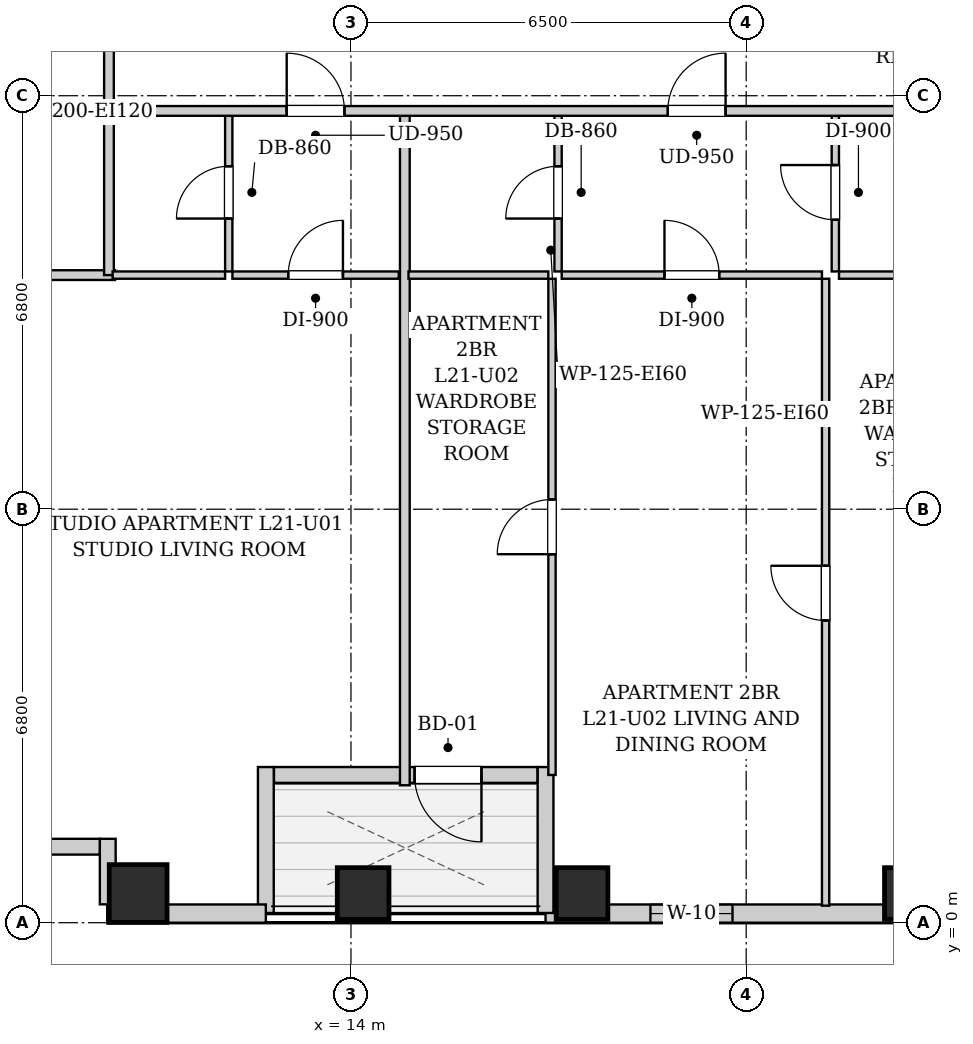
"""IFC4 building model, lengths in metres.
Left out: names, types, materials, properties, quantities, classifications, styles, units other than length and angle.
Written with IfcOpenShell. Run it as: python <this file> out.ifc"""

import sys

from ifc_helpers import new_model, si_unit, direction, frame, frame_2d, origin, origin_2d, place, context, subcontext, project, spatial, rectangle, extrude, element, fill, save


model = new_model("IFC4")
c1 = context("Model", 3, precision=1e-05, world=origin(), true_north=direction((0.0, 1.0)))
c2 = subcontext(c1, "Body", "Model", "MODEL_VIEW")
j1 = project(units=[si_unit("LENGTHUNIT", "METRE"), si_unit("PLANEANGLEUNIT", "RADIAN")], contexts=[c1])
p1 = place(None, origin())
s1 = spatial("IfcSite", under=j1, at=p1, CompositionType="ELEMENT")
p2 = place(p1, origin())
s2 = spatial("IfcBuilding", under=s1, at=p2, CompositionType="ELEMENT")
p3 = place(p2, frame((0.0, 0.0, 78.3)))
s3 = spatial("IfcBuildingStorey", under=s2, at=p3, CompositionType="ELEMENT", Elevation=78.3)
p4 = place(p3, frame((10.5, 0.48, 0.0), z_axis=(0.0, 0.0, 1.0), x_axis=(1.0, 0.0, 0.0)))
e1 = element("IfcColumn", 1, at=p4, inside=s3, PredefinedType="COLUMN", context=c2, shape_type="SweptSolid", body=[
    extrude(rectangle(XDim=0.95, YDim=0.95, at=origin_2d()), origin(), (0.0, 0.0, 1.0), 3.2),
])
for number, where, z_axis, x_axis in (
    (2, (14.2, 0.48, 0.0), (0.0, 0.0, 1.0), (1.0, 0.0, 0.0)),
    (3, (17.8, 0.48, 0.0), (0.0, 0.0, 1.0), (1.0, 0.0, 0.0)),
    (4, (23.2, 0.48, 0.0), (0.0, 0.0, 1.0), (1.0, 0.0, 0.0)),
):
    element("IfcColumn", number, at=place(p3, frame(where, z_axis=z_axis, x_axis=x_axis)), inside=s3, PredefinedType="COLUMN", context=c2, shape_type="SweptSolid", body=[
        extrude(rectangle(XDim=0.85, YDim=0.85, at=origin_2d()), origin(), (0.0, 0.0, 1.0), 3.2),
    ])
p5 = place(p3, frame((40.9, 0.15, 0.0), z_axis=(0.0, 0.0, 1.0), x_axis=(-1.0, 0.0, 0.0)))
e5 = element("IfcWall", 5, at=p5, inside=s3, PredefinedType="SOLIDWALL", context=c2, shape_type="SweptSolid", body=[
    extrude(rectangle(XDim=23.7, YDim=0.3, at=frame_2d((11.85, 0.0))), origin(), (0.0, 0.0, 1.0), 2.94),
])
p6 = place(p5, frame((20.625, 0.0, 0.55)))
e6 = element("IfcOpeningElement", 6, at=p6, cuts=e5, PredefinedType="OPENING", context=c2, shape_type="SweptSolid", body=[
    extrude(rectangle(XDim=1.35, YDim=1.2, at=frame_2d((0.675, 0.6))), frame((0.0, 0.16, 0.0), z_axis=(0.0, -1.0, 0.0), x_axis=(1.0, 0.0, 0.0)), (0.0, 0.0, 1.0), 0.32),
])
p7 = place(p5, frame((12.55, 0.0, 0.55)))
e7 = element("IfcOpeningElement", 7, at=p7, cuts=e5, PredefinedType="OPENING", context=c2, shape_type="SweptSolid", body=[
    extrude(rectangle(XDim=0.85, YDim=1.2, at=frame_2d((0.425, 0.6))), frame((0.0, 0.16, 0.0), z_axis=(0.0, -1.0, 0.0), x_axis=(1.0, 0.0, 0.0)), (0.0, 0.0, 1.0), 0.32),
])
p8 = place(p5, frame((9.6, 0.0, 0.55)))
e8 = element("IfcOpeningElement", 8, at=p8, cuts=e5, PredefinedType="OPENING", context=c2, shape_type="SweptSolid", body=[
    extrude(rectangle(XDim=1.35, YDim=1.2, at=frame_2d((0.675, 0.6))), frame((0.0, 0.16, 0.0), z_axis=(0.0, -1.0, 0.0), x_axis=(1.0, 0.0, 0.0)), (0.0, 0.0, 1.0), 0.32),
])
p9 = place(p5, frame((5.765, 0.0, 0.55)))
e9 = element("IfcOpeningElement", 9, at=p9, cuts=e5, PredefinedType="OPENING", context=c2, shape_type="SweptSolid", body=[
    extrude(rectangle(XDim=1.35, YDim=1.2, at=frame_2d((0.675, 0.6))), frame((0.0, 0.16, 0.0), z_axis=(0.0, -1.0, 0.0), x_axis=(1.0, 0.0, 0.0)), (0.0, 0.0, 1.0), 0.32),
])
p10 = place(p5, frame((2.1, 0.0, 0.55)))
e10 = element("IfcOpeningElement", 10, at=p10, cuts=e5, PredefinedType="OPENING", context=c2, shape_type="SweptSolid", body=[
    extrude(rectangle(XDim=1.35, YDim=1.2, at=frame_2d((0.675, 0.6))), frame((0.0, 0.16, 0.0), z_axis=(0.0, -1.0, 0.0), x_axis=(1.0, 0.0, 0.0)), (0.0, 0.0, 1.0), 0.32),
])
p11 = place(p3, frame((17.2, 0.16, 0.0), z_axis=(0.0, 0.0, 1.0), x_axis=(0.0, 1.0, 0.0)))
e11 = element("IfcWall", 11, at=p11, inside=s3, PredefinedType="SOLIDWALL", context=c2, shape_type="SweptSolid", body=[
    extrude(rectangle(XDim=2.4, YDim=0.26, at=frame_2d((1.2, 0.0))), origin(), (0.0, 0.0, 1.0), 2.94),
])
p12 = place(p3, frame((17.066, 2.43, 0.0), z_axis=(0.0, 0.0, 1.0), x_axis=(-1.0, 0.0, 0.0)))
e12 = element("IfcWall", 12, at=p12, inside=s3, PredefinedType="SOLIDWALL", context=c2, shape_type="SweptSolid", body=[
    extrude(rectangle(XDim=4.332, YDim=0.26, at=frame_2d((2.166, 0.0))), origin(), (0.0, 0.0, 1.0), 2.94),
])
p13 = place(p12, frame((0.92, 0.0, 0.0)))
e13 = element("IfcOpeningElement", 13, at=p13, cuts=e12, PredefinedType="OPENING", context=c2, shape_type="SweptSolid", body=[
    extrude(rectangle(XDim=1.1, YDim=2.0, at=frame_2d((0.55, 1.0))), frame((0.0, 0.14, 0.0), z_axis=(0.0, -1.0, 0.0), x_axis=(1.0, 0.0, 0.0)), (0.0, 0.0, 1.0), 0.28),
])
p14 = place(p3, frame((12.6, 2.56, 0.0), z_axis=(0.0, 0.0, 1.0), x_axis=(0.0, -1.0, 0.0)))
e14 = element("IfcWall", 14, at=p14, inside=s3, PredefinedType="SOLIDWALL", context=c2, shape_type="SweptSolid", body=[
    extrude(rectangle(XDim=2.4, YDim=0.26, at=frame_2d((1.2, 0.0))), origin(), (0.0, 0.0, 1.0), 2.94),
])
p15 = place(p3, frame((12.6, 0.15, 0.0), z_axis=(0.0, 0.0, 1.0), x_axis=(-1.0, 0.0, 0.0)))
e15 = element("IfcWall", 15, at=p15, inside=s3, PredefinedType="SOLIDWALL", context=c2, shape_type="SweptSolid", body=[
    extrude(rectangle(XDim=2.6, YDim=0.3, at=frame_2d((1.3, 0.0))), origin(), (0.0, 0.0, 1.0), 2.94),
])
p16 = place(p3, frame((10.0, 0.302, 0.0), z_axis=(0.0, 0.0, 1.0), x_axis=(0.0, 1.0, 0.0)))
e16 = element("IfcWall", 16, at=p16, inside=s3, PredefinedType="SOLIDWALL", context=c2, shape_type="SweptSolid", body=[
    extrude(rectangle(XDim=1.078, YDim=0.26, at=frame_2d((0.539, 0.0))), origin(), (0.0, 0.0, 1.0), 2.94),
])
p17 = place(p3, frame((9.868, 1.25, 0.0), z_axis=(0.0, 0.0, 1.0), x_axis=(-1.0, 0.0, 0.0)))
e17 = element("IfcWall", 17, at=p17, inside=s3, PredefinedType="SOLIDWALL", context=c2, shape_type="SweptSolid", body=[
    extrude(rectangle(XDim=1.248, YDim=0.26, at=frame_2d((0.624, 0.0))), origin(), (0.0, 0.0, 1.0), 2.94),
])
p18 = place(p3, frame((10.02, 13.35, 0.0), z_axis=(0.0, 0.0, 1.0), x_axis=(0.0, 1.0, 0.0)))
e18 = element("IfcWall", 18, at=p18, inside=s3, PredefinedType="PARTITIONING", context=c2, shape_type="SweptSolid", body=[
    extrude(rectangle(XDim=1.74, YDim=0.16, at=frame_2d((0.87, 0.0))), origin(), (0.0, 0.0, 1.0), 2.94),
])
p19 = place(p3, frame((7.78, 10.65, 0.0), z_axis=(0.0, 0.0, 1.0), x_axis=(1.0, 0.0, 0.0)))
e19 = element("IfcWall", 19, at=p19, inside=s3, PredefinedType="PARTITIONING", context=c2, shape_type="SweptSolid", body=[
    extrude(rectangle(XDim=2.34, YDim=0.16, at=frame_2d((1.17, 0.0))), origin(), (0.0, 0.0, 1.0), 2.94),
])
p20 = place(p3, frame((10.02, 10.65, 0.0), z_axis=(0.0, 0.0, 1.0), x_axis=(0.0, 1.0, 0.0)))
e20 = element("IfcWall", 20, at=p20, inside=s3, PredefinedType="PARTITIONING", context=c2, shape_type="SweptSolid", body=[
    extrude(rectangle(XDim=2.66, YDim=0.16, at=frame_2d((1.33, 0.0))), origin(), (0.0, 0.0, 1.0), 2.94),
])
p21 = place(p3, frame((11.99, 10.71, 0.0), z_axis=(0.0, 0.0, 1.0), x_axis=(0.0, 1.0, 0.0)))
e21 = element("IfcWall", 21, at=p21, inside=s3, PredefinedType="PARTITIONING", context=c2, shape_type="SweptSolid", body=[
    extrude(rectangle(XDim=2.6, YDim=0.12, at=frame_2d((1.3, 0.0))), origin(), (0.0, 0.0, 1.0), 2.94),
])
p22 = place(p21, frame((0.87, 0.0, 0.0)))
e22 = element("IfcOpeningElement", 22, at=p22, cuts=e21, PredefinedType="OPENING", context=c2, shape_type="SweptSolid", body=[
    extrude(rectangle(XDim=0.86, YDim=2.05, at=frame_2d((0.43, 1.025))), frame((0.0, 0.07, 0.0), z_axis=(0.0, -1.0, 0.0), x_axis=(1.0, 0.0, 0.0)), (0.0, 0.0, 1.0), 0.14),
])
p23 = place(p3, frame((10.08, 10.65, 0.0), z_axis=(0.0, 0.0, 1.0), x_axis=(1.0, 0.0, 0.0)))
e23 = element("IfcWall", 23, at=p23, inside=s3, PredefinedType="PARTITIONING", context=c2, shape_type="SweptSolid", body=[
    extrude(rectangle(XDim=1.85, YDim=0.12, at=frame_2d((0.925, 0.0))), origin(), (0.0, 0.0, 1.0), 2.94),
])
p24 = place(p3, frame((12.05, 10.65, 0.0), z_axis=(0.0, 0.0, 1.0), x_axis=(1.0, 0.0, 0.0)))
e24 = element("IfcWall", 24, at=p24, inside=s3, PredefinedType="PARTITIONING", context=c2, shape_type="SweptSolid", body=[
    extrude(rectangle(XDim=2.736, YDim=0.12, at=frame_2d((1.368, 0.0))), origin(), (0.0, 0.0, 1.0), 2.94),
])
p25 = place(p24, frame((0.918, 0.0, 0.0)))
e25 = element("IfcOpeningElement", 25, at=p25, cuts=e24, PredefinedType="OPENING", context=c2, shape_type="SweptSolid", body=[
    extrude(rectangle(XDim=0.9, YDim=2.05, at=frame_2d((0.45, 1.025))), frame((0.0, 0.07, 0.0), z_axis=(0.0, -1.0, 0.0), x_axis=(1.0, 0.0, 0.0)), (0.0, 0.0, 1.0), 0.14),
])
p26 = place(p3, frame((14.886, 2.26, 0.0), z_axis=(0.0, 0.0, 1.0), x_axis=(0.0, 1.0, 0.0)))
e26 = element("IfcWall", 26, at=p26, inside=s3, PredefinedType="PARTITIONING", context=c2, shape_type="SweptSolid", body=[
    extrude(rectangle(XDim=11.05, YDim=0.16, at=frame_2d((5.525, 0.0))), origin(), (0.0, 0.0, 1.0), 2.94),
])
p27 = place(p3, frame((17.406, 10.71, 0.0), z_axis=(0.0, 0.0, 1.0), x_axis=(0.0, 1.0, 0.0)))
e27 = element("IfcWall", 27, at=p27, inside=s3, PredefinedType="PARTITIONING", context=c2, shape_type="SweptSolid", body=[
    extrude(rectangle(XDim=2.6, YDim=0.12, at=frame_2d((1.3, 0.0))), origin(), (0.0, 0.0, 1.0), 2.94),
])
p28 = place(p27, frame((0.87, 0.0, 0.0)))
e28 = element("IfcOpeningElement", 28, at=p28, cuts=e27, PredefinedType="OPENING", context=c2, shape_type="SweptSolid", body=[
    extrude(rectangle(XDim=0.86, YDim=2.05, at=frame_2d((0.43, 1.025))), frame((0.0, 0.07, 0.0), z_axis=(0.0, -1.0, 0.0), x_axis=(1.0, 0.0, 0.0)), (0.0, 0.0, 1.0), 0.14),
])
p29 = place(p3, frame((14.946, 10.65, 0.0), z_axis=(0.0, 0.0, 1.0), x_axis=(1.0, 0.0, 0.0)))
e29 = element("IfcWall", 29, at=p29, inside=s3, PredefinedType="PARTITIONING", context=c2, shape_type="SweptSolid", body=[
    extrude(rectangle(XDim=2.3, YDim=0.12, at=frame_2d((1.15, 0.0))), origin(), (0.0, 0.0, 1.0), 2.94),
])
p30 = place(p3, frame((21.966, 10.71, 0.0), z_axis=(0.0, 0.0, 1.0), x_axis=(0.0, 1.0, 0.0)))
e30 = element("IfcWall", 30, at=p30, inside=s3, PredefinedType="PARTITIONING", context=c2, shape_type="SweptSolid", body=[
    extrude(rectangle(XDim=2.6, YDim=0.12, at=frame_2d((1.3, 0.0))), origin(), (0.0, 0.0, 1.0), 2.94),
])
p31 = place(p30, frame((0.85, 0.0, 0.0)))
e31 = element("IfcOpeningElement", 31, at=p31, cuts=e30, PredefinedType="OPENING", context=c2, shape_type="SweptSolid", body=[
    extrude(rectangle(XDim=0.9, YDim=2.05, at=frame_2d((0.45, 1.025))), frame((0.0, 0.07, 0.0), z_axis=(0.0, -1.0, 0.0), x_axis=(1.0, 0.0, 0.0)), (0.0, 0.0, 1.0), 0.14),
])
p32 = place(p3, frame((17.466, 10.65, 0.0), z_axis=(0.0, 0.0, 1.0), x_axis=(1.0, 0.0, 0.0)))
e32 = element("IfcWall", 32, at=p32, inside=s3, PredefinedType="PARTITIONING", context=c2, shape_type="SweptSolid", body=[
    extrude(rectangle(XDim=4.28, YDim=0.12, at=frame_2d((2.14, 0.0))), origin(), (0.0, 0.0, 1.0), 2.94),
])
p33 = place(p32, frame((1.69, 0.0, 0.0)))
e33 = element("IfcOpeningElement", 33, at=p33, cuts=e32, PredefinedType="OPENING", context=c2, shape_type="SweptSolid", body=[
    extrude(rectangle(XDim=0.9, YDim=2.05, at=frame_2d((0.45, 1.025))), frame((0.0, 0.07, 0.0), z_axis=(0.0, -1.0, 0.0), x_axis=(1.0, 0.0, 0.0)), (0.0, 0.0, 1.0), 0.14),
])
p34 = place(p3, frame((22.026, 10.65, 0.0), z_axis=(0.0, 0.0, 1.0), x_axis=(1.0, 0.0, 0.0)))
e34 = element("IfcWall", 34, at=p34, inside=s3, PredefinedType="PARTITIONING", context=c2, shape_type="SweptSolid", body=[
    extrude(rectangle(XDim=2.905, YDim=0.12, at=frame_2d((1.453, 0.0))), origin(), (0.0, 0.0, 1.0), 2.94),
])
p35 = place(p34, frame((1.003, 0.0, 0.0)))
e35 = element("IfcOpeningElement", 35, at=p35, cuts=e34, PredefinedType="OPENING", context=c2, shape_type="SweptSolid", body=[
    extrude(rectangle(XDim=0.9, YDim=2.05, at=frame_2d((0.45, 1.025))), frame((0.0, 0.07, 0.0), z_axis=(0.0, -1.0, 0.0), x_axis=(1.0, 0.0, 0.0)), (0.0, 0.0, 1.0), 0.14),
])
p36 = place(p3, frame((17.306, 2.43, 0.0), z_axis=(0.0, 0.0, 1.0), x_axis=(0.0, 1.0, 0.0)))
e36 = element("IfcWall", 36, at=p36, inside=s3, PredefinedType="PARTITIONING", context=c2, shape_type="SweptSolid", body=[
    extrude(rectangle(XDim=8.16, YDim=0.12, at=frame_2d((4.08, 0.0))), origin(), (0.0, 0.0, 1.0), 2.94),
])
p37 = place(p36, frame((3.63, 0.0, 0.0)))
e37 = element("IfcOpeningElement", 37, at=p37, cuts=e36, PredefinedType="OPENING", context=c2, shape_type="SweptSolid", body=[
    extrude(rectangle(XDim=0.9, YDim=2.05, at=frame_2d((0.45, 1.025))), frame((0.0, 0.07, 0.0), z_axis=(0.0, -1.0, 0.0), x_axis=(1.0, 0.0, 0.0)), (0.0, 0.0, 1.0), 0.14),
])
p38 = place(p3, frame((21.806, 0.28, 0.0), z_axis=(0.0, 0.0, 1.0), x_axis=(0.0, 1.0, 0.0)))
e38 = element("IfcWall", 38, at=p38, inside=s3, PredefinedType="PARTITIONING", context=c2, shape_type="SweptSolid", body=[
    extrude(rectangle(XDim=10.31, YDim=0.12, at=frame_2d((5.155, 0.0))), origin(), (0.0, 0.0, 1.0), 2.94),
])
p39 = place(p38, frame((4.69, 0.0, 0.0)))
e39 = element("IfcOpeningElement", 39, at=p39, cuts=e38, PredefinedType="OPENING", context=c2, shape_type="SweptSolid", body=[
    extrude(rectangle(XDim=0.9, YDim=2.05, at=frame_2d((0.45, 1.025))), frame((0.0, 0.07, 0.0), z_axis=(0.0, -1.0, 0.0), x_axis=(1.0, 0.0, 0.0)), (0.0, 0.0, 1.0), 0.14),
])
p40 = place(p3, frame((10.05, 13.35, 0.0), z_axis=(0.0, 0.0, 1.0), x_axis=(1.0, 0.0, 0.0)))
e40 = element("IfcWall", 40, at=p40, inside=s3, PredefinedType="PARTITIONING", context=c2, shape_type="SweptSolid", body=[
    extrude(rectangle(XDim=30.8, YDim=0.16, at=frame_2d((15.4, 0.0))), origin(), (0.0, 0.0, 1.0), 2.94),
])
p41 = place(p40, frame((2.893, 0.0, 0.0)))
e41 = element("IfcOpeningElement", 41, at=p41, cuts=e40, PredefinedType="OPENING", context=c2, shape_type="SweptSolid", body=[
    extrude(rectangle(XDim=0.95, YDim=2.1, at=frame_2d((0.475, 1.05))), frame((0.0, 0.09, 0.0), z_axis=(0.0, -1.0, 0.0), x_axis=(1.0, 0.0, 0.0)), (0.0, 0.0, 1.0), 0.18),
])
p42 = place(p40, frame((9.161, 0.0, 0.0)))
e42 = element("IfcOpeningElement", 42, at=p42, cuts=e40, PredefinedType="OPENING", context=c2, shape_type="SweptSolid", body=[
    extrude(rectangle(XDim=0.95, YDim=2.1, at=frame_2d((0.475, 1.05))), frame((0.0, 0.09, 0.0), z_axis=(0.0, -1.0, 0.0), x_axis=(1.0, 0.0, 0.0)), (0.0, 0.0, 1.0), 0.18),
])
p43 = place(p40, frame((26.306, 0.0, 0.0)))
e43 = element("IfcOpeningElement", 43, at=p43, cuts=e40, PredefinedType="OPENING", context=c2, shape_type="SweptSolid", body=[
    extrude(rectangle(XDim=0.95, YDim=2.1, at=frame_2d((0.475, 1.05))), frame((0.0, 0.09, 0.0), z_axis=(0.0, -1.0, 0.0), x_axis=(1.0, 0.0, 0.0)), (0.0, 0.0, 1.0), 0.18),
])
p44 = place(p22, origin())
e44 = element("IfcDoor", 44, at=p44, inside=s3, OperationType="SINGLE_SWING_LEFT", PredefinedType="DOOR", context=c2, shape_type="SweptSolid", body=[
    extrude(rectangle(XDim=0.86, YDim=2.05, at=frame_2d((0.43, 1.025))), frame((0.0, 0.025, 0.0), z_axis=(0.0, -1.0, 0.0), x_axis=(1.0, 0.0, 0.0)), (0.0, 0.0, 1.0), 0.05),
])
fill(e22, e44)
p45 = place(p25, origin())
e45 = element("IfcDoor", 45, at=p45, inside=s3, OperationType="SINGLE_SWING_RIGHT", PredefinedType="DOOR", context=c2, shape_type="SweptSolid", body=[
    extrude(rectangle(XDim=0.9, YDim=2.05, at=frame_2d((0.45, 1.025))), frame((0.0, 0.025, 0.0), z_axis=(0.0, -1.0, 0.0), x_axis=(1.0, 0.0, 0.0)), (0.0, 0.0, 1.0), 0.05),
])
fill(e25, e45)
p46 = place(p28, origin())
e46 = element("IfcDoor", 46, at=p46, inside=s3, OperationType="SINGLE_SWING_LEFT", PredefinedType="DOOR", context=c2, shape_type="SweptSolid", body=[
    extrude(rectangle(XDim=0.86, YDim=2.05, at=frame_2d((0.43, 1.025))), frame((0.0, 0.025, 0.0), z_axis=(0.0, -1.0, 0.0), x_axis=(1.0, 0.0, 0.0)), (0.0, 0.0, 1.0), 0.05),
])
fill(e28, e46)
p47 = place(p31, origin())
e47 = element("IfcDoor", 47, at=p47, inside=s3, OperationType="SINGLE_SWING_RIGHT", PredefinedType="DOOR", context=c2, shape_type="SweptSolid", body=[
    extrude(rectangle(XDim=0.9, YDim=2.05, at=frame_2d((0.45, 1.025))), frame((0.0, 0.025, 0.0), z_axis=(0.0, -1.0, 0.0), x_axis=(1.0, 0.0, 0.0)), (0.0, 0.0, 1.0), 0.05),
])
fill(e31, e47)
p48 = place(p33, origin())
e48 = element("IfcDoor", 48, at=p48, inside=s3, OperationType="SINGLE_SWING_LEFT", PredefinedType="DOOR", context=c2, shape_type="SweptSolid", body=[
    extrude(rectangle(XDim=0.9, YDim=2.05, at=frame_2d((0.45, 1.025))), frame((0.0, 0.025, 0.0), z_axis=(0.0, -1.0, 0.0), x_axis=(1.0, 0.0, 0.0)), (0.0, 0.0, 1.0), 0.05),
])
fill(e33, e48)
p49 = place(p37, origin())
e49 = element("IfcDoor", 49, at=p49, inside=s3, OperationType="SINGLE_SWING_LEFT", PredefinedType="DOOR", context=c2, shape_type="SweptSolid", body=[
    extrude(rectangle(XDim=0.9, YDim=2.05, at=frame_2d((0.45, 1.025))), frame((0.0, 0.025, 0.0), z_axis=(0.0, -1.0, 0.0), x_axis=(1.0, 0.0, 0.0)), (0.0, 0.0, 1.0), 0.05),
])
fill(e37, e49)
p50 = place(p39, origin())
e50 = element("IfcDoor", 50, at=p50, inside=s3, OperationType="SINGLE_SWING_RIGHT", PredefinedType="DOOR", context=c2, shape_type="SweptSolid", body=[
    extrude(rectangle(XDim=0.9, YDim=2.05, at=frame_2d((0.45, 1.025))), frame((0.0, 0.025, 0.0), z_axis=(0.0, -1.0, 0.0), x_axis=(1.0, 0.0, 0.0)), (0.0, 0.0, 1.0), 0.05),
])
fill(e39, e50)
p51 = place(p41, origin())
e51 = element("IfcDoor", 51, at=p51, inside=s3, OperationType="SINGLE_SWING_LEFT", PredefinedType="DOOR", context=c2, shape_type="SweptSolid", body=[
    extrude(rectangle(XDim=0.95, YDim=2.1, at=frame_2d((0.475, 1.05))), frame((0.0, 0.025, 0.0), z_axis=(0.0, -1.0, 0.0), x_axis=(1.0, 0.0, 0.0)), (0.0, 0.0, 1.0), 0.05),
])
fill(e41, e51)
p52 = place(p42, origin())
e52 = element("IfcDoor", 52, at=p52, inside=s3, OperationType="SINGLE_SWING_RIGHT", PredefinedType="DOOR", context=c2, shape_type="SweptSolid", body=[
    extrude(rectangle(XDim=0.95, YDim=2.1, at=frame_2d((0.475, 1.05))), frame((0.0, 0.025, 0.0), z_axis=(0.0, -1.0, 0.0), x_axis=(1.0, 0.0, 0.0)), (0.0, 0.0, 1.0), 0.05),
])
fill(e42, e52)
p53 = place(p13, origin())
e53 = element("IfcDoor", 53, at=p53, inside=s3, OperationType="SINGLE_SWING_LEFT", PredefinedType="DOOR", context=c2, shape_type="SweptSolid", body=[
    extrude(rectangle(XDim=1.1, YDim=2.0, at=frame_2d((0.55, 1.0))), frame((0.0, 0.025, 0.0), z_axis=(0.0, -1.0, 0.0), x_axis=(1.0, 0.0, 0.0)), (0.0, 0.0, 1.0), 0.05),
])
fill(e13, e53)
p54 = place(p6, origin())
e54 = element("IfcWindow", 54, at=p54, inside=s3, PartitioningType="SINGLE_PANEL", PredefinedType="WINDOW", context=c2, shape_type="SweptSolid", body=[
    extrude(rectangle(XDim=1.35, YDim=1.2, at=frame_2d((0.675, 0.6))), frame((0.0, 0.03, 0.0), z_axis=(0.0, -1.0, 0.0), x_axis=(1.0, 0.0, 0.0)), (0.0, 0.0, 1.0), 0.06),
])
fill(e6, e54)
save(model, sys.argv[1])
